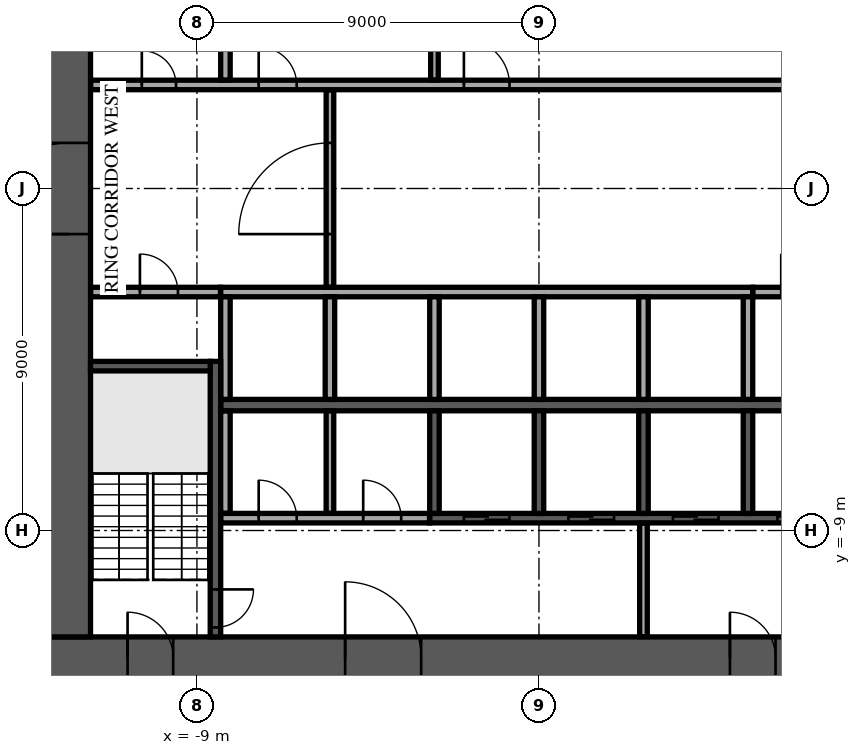
"""IFC4 building model, lengths in metres.
Left out: names, types, materials, properties, quantities, classifications, styles, units other than length and angle.
Written with IfcOpenShell. Run it as: python <this file> out.ifc"""

import sys

from ifc_helpers import new_model, si_unit, direction, frame, frame_2d, origin, place, context, subcontext, project, spatial, rectangle, extrude, element, fill, save


model = new_model("IFC4")
c1 = context("Model", 3, precision=1e-05, world=origin(), true_north=direction((0.0, 1.0)))
c2 = subcontext(c1, "Body", "Model", "MODEL_VIEW")
j1 = project(units=[si_unit("LENGTHUNIT", "METRE"), si_unit("PLANEANGLEUNIT", "RADIAN")], contexts=[c1])
p1 = place(None, origin())
s1 = spatial("IfcSite", under=j1, at=p1, CompositionType="ELEMENT")
p2 = place(p1, origin())
s2 = spatial("IfcBuilding", under=s1, at=p2, CompositionType="ELEMENT")
p3 = place(p2, frame((0.0, 0.0, 122.1)))
s3 = spatial("IfcBuildingStorey", under=s2, at=p3, CompositionType="ELEMENT", Elevation=122.1)
p4 = place(p3, frame((-12.9, -12.35, 0.0), z_axis=(0.0, 0.0, 1.0), x_axis=(1.0, 0.0, 0.0)))
e1 = element("IfcWall", 1, at=p4, inside=s3, PredefinedType="SHEAR", context=c2, shape_type="SweptSolid", body=[
    extrude(rectangle(XDim=25.8, YDim=1.1, at=frame_2d((12.9, 0.0))), origin(), (0.0, 0.0, 1.0), 3.58),
])
p5 = place(p4, frame((7.8, 0.0, 0.0)))
e2 = element("IfcOpeningElement", 2, at=p5, cuts=e1, PredefinedType="OPENING", context=c2, shape_type="SweptSolid", body=[
    extrude(rectangle(XDim=2.0, YDim=2.1, at=frame_2d((1.0, 1.05))), frame((0.0, 0.56, 0.0), z_axis=(0.0, -1.0, 0.0), x_axis=(1.0, 0.0, 0.0)), (0.0, 0.0, 1.0), 1.12),
])
p6 = place(p4, frame((17.925, 0.0, 0.0)))
e3 = element("IfcOpeningElement", 3, at=p6, cuts=e1, PredefinedType="OPENING", context=c2, shape_type="SweptSolid", body=[
    extrude(rectangle(XDim=1.2, YDim=2.1, at=frame_2d((0.6, 1.05))), frame((0.0, 0.56, 0.0), z_axis=(0.0, -1.0, 0.0), x_axis=(1.0, 0.0, 0.0)), (0.0, 0.0, 1.0), 1.12),
])
p7 = place(p4, frame((2.075, 0.0, 0.0)))
e4 = element("IfcOpeningElement", 4, at=p7, cuts=e1, PredefinedType="OPENING", context=c2, shape_type="SweptSolid", body=[
    extrude(rectangle(XDim=1.2, YDim=2.1, at=frame_2d((0.6, 1.05))), frame((0.0, 0.56, 0.0), z_axis=(0.0, -1.0, 0.0), x_axis=(1.0, 0.0, 0.0)), (0.0, 0.0, 1.0), 1.12),
])
p8 = place(p4, frame((22.525, 0.0, 0.0)))
e5 = element("IfcOpeningElement", 5, at=p8, cuts=e1, PredefinedType="OPENING", context=c2, shape_type="SweptSolid", body=[
    extrude(rectangle(XDim=1.2, YDim=2.1, at=frame_2d((0.6, 1.05))), frame((0.0, 0.56, 0.0), z_axis=(0.0, -1.0, 0.0), x_axis=(1.0, 0.0, 0.0)), (0.0, 0.0, 1.0), 1.12),
])
p9 = place(p3, frame((-12.35, -11.8, 0.0), z_axis=(0.0, 0.0, 1.0), x_axis=(0.0, 1.0, 0.0)))
e6 = element("IfcWall", 6, at=p9, inside=s3, PredefinedType="SHEAR", context=c2, shape_type="SweptSolid", body=[
    extrude(rectangle(XDim=23.6, YDim=1.1, at=frame_2d((11.8, 0.0))), origin(), (0.0, 0.0, 1.0), 3.58),
])
p10 = place(p9, frame((10.6, 0.0, 0.0)))
e7 = element("IfcOpeningElement", 7, at=p10, cuts=e6, PredefinedType="OPENING", context=c2, shape_type="SweptSolid", body=[
    extrude(rectangle(XDim=2.4, YDim=2.4, at=frame_2d((1.2, 1.2))), frame((0.0, 0.56, 0.0), z_axis=(0.0, -1.0, 0.0), x_axis=(1.0, 0.0, 0.0)), (0.0, 0.0, 1.0), 1.12),
])
p11 = place(p3, frame((-8.375, -5.7, 0.0), z_axis=(0.0, 0.0, 1.0), x_axis=(1.0, 0.0, 0.0)))
e8 = element("IfcWall", 8, at=p11, inside=s3, PredefinedType="SOLIDWALL", context=c2, shape_type="SweptSolid", body=[
    extrude(rectangle(XDim=16.75, YDim=0.3, at=frame_2d((8.375, 0.0))), origin(), (0.0, 0.0, 1.0), 3.58),
])
p12 = place(p3, frame((-8.375, -2.725, 0.0), z_axis=(0.0, 0.0, 1.0), x_axis=(1.0, 0.0, 0.0)))
e9 = element("IfcWall", 9, at=p12, inside=s3, PredefinedType="SOLIDWALL", context=c2, shape_type="SweptSolid", body=[
    extrude(rectangle(XDim=14.0, YDim=0.25, at=frame_2d((7.0, 0.0))), origin(), (0.0, 0.0, 1.0), 3.58),
])
for number, where, z_axis, x_axis in (
    (10, (-8.25, -5.55, 0.0), (0.0, 0.0, 1.0), (0.0, 1.0, 0.0)),
    (11, (-5.5, -5.55, 0.0), (0.0, 0.0, 1.0), (0.0, 1.0, 0.0)),
    (12, (-2.75, -5.55, 0.0), (0.0, 0.0, 1.0), (0.0, 1.0, 0.0)),
    (13, (0.0, -5.55, 0.0), (0.0, 0.0, 1.0), (0.0, 1.0, 0.0)),
    (14, (2.75, -5.55, 0.0), (0.0, 0.0, 1.0), (0.0, 1.0, 0.0)),
    (15, (5.5, -5.55, 0.0), (0.0, 0.0, 1.0), (0.0, 1.0, 0.0)),
):
    element("IfcWall", number, at=place(p3, frame(where, z_axis=z_axis, x_axis=x_axis)), inside=s3, PredefinedType="SOLIDWALL", context=c2, shape_type="SweptSolid", body=[
        extrude(rectangle(XDim=2.7, YDim=0.25, at=frame_2d((1.35, 0.0))), origin(), (0.0, 0.0, 1.0), 3.58),
    ])
p13 = place(p3, frame((-2.875, -8.675, 0.0), z_axis=(0.0, 0.0, 1.0), x_axis=(1.0, 0.0, 0.0)))
e16 = element("IfcWall", 16, at=p13, inside=s3, PredefinedType="SOLIDWALL", context=c2, shape_type="SweptSolid", body=[
    extrude(rectangle(XDim=11.25, YDim=0.25, at=frame_2d((5.625, 0.0))), origin(), (0.0, 0.0, 1.0), 3.58),
])
p14 = place(p13, frame((0.9, 0.0, 0.0)))
e17 = element("IfcOpeningElement", 17, at=p14, cuts=e16, PredefinedType="OPENING", context=c2, shape_type="SweptSolid", body=[
    extrude(rectangle(XDim=1.2, YDim=2.1, at=frame_2d((0.6, 1.05))), frame((0.0, 0.135, 0.0), z_axis=(0.0, -1.0, 0.0), x_axis=(1.0, 0.0, 0.0)), (0.0, 0.0, 1.0), 0.27),
])
p15 = place(p13, frame((3.65, 0.0, 0.0)))
e18 = element("IfcOpeningElement", 18, at=p15, cuts=e16, PredefinedType="OPENING", context=c2, shape_type="SweptSolid", body=[
    extrude(rectangle(XDim=1.2, YDim=2.1, at=frame_2d((0.6, 1.05))), frame((0.0, 0.135, 0.0), z_axis=(0.0, -1.0, 0.0), x_axis=(1.0, 0.0, 0.0)), (0.0, 0.0, 1.0), 0.27),
])
p16 = place(p13, frame((6.4, 0.0, 0.0)))
e19 = element("IfcOpeningElement", 19, at=p16, cuts=e16, PredefinedType="OPENING", context=c2, shape_type="SweptSolid", body=[
    extrude(rectangle(XDim=1.2, YDim=2.1, at=frame_2d((0.6, 1.05))), frame((0.0, 0.135, 0.0), z_axis=(0.0, -1.0, 0.0), x_axis=(1.0, 0.0, 0.0)), (0.0, 0.0, 1.0), 0.27),
])
p17 = place(p13, frame((9.15, 0.0, 0.0)))
e20 = element("IfcOpeningElement", 20, at=p17, cuts=e16, PredefinedType="OPENING", context=c2, shape_type="SweptSolid", body=[
    extrude(rectangle(XDim=1.2, YDim=2.1, at=frame_2d((0.6, 1.05))), frame((0.0, 0.135, 0.0), z_axis=(0.0, -1.0, 0.0), x_axis=(1.0, 0.0, 0.0)), (0.0, 0.0, 1.0), 0.27),
])
for number, where, z_axis, x_axis in (
    (21, (-2.75, -8.55, 0.0), (0.0, 0.0, 1.0), (0.0, 1.0, 0.0)),
    (22, (0.0, -8.55, 0.0), (0.0, 0.0, 1.0), (0.0, 1.0, 0.0)),
    (23, (2.75, -8.55, 0.0), (0.0, 0.0, 1.0), (0.0, 1.0, 0.0)),
    (24, (5.5, -8.55, 0.0), (0.0, 0.0, 1.0), (0.0, 1.0, 0.0)),
):
    element("IfcWall", number, at=place(p3, frame(where, z_axis=z_axis, x_axis=x_axis)), inside=s3, PredefinedType="SOLIDWALL", context=c2, shape_type="SweptSolid", body=[
        extrude(rectangle(XDim=2.7, YDim=0.25, at=frame_2d((1.35, 0.0))), origin(), (0.0, 0.0, 1.0), 3.58),
    ])
p18 = place(p3, frame((-8.512, -4.55, 0.0), z_axis=(0.0, 0.0, 1.0), x_axis=(0.0, -1.0, 0.0)))
e25 = element("IfcWall", 25, at=p18, inside=s3, PredefinedType="SOLIDWALL", context=c2, shape_type="SweptSolid", body=[
    extrude(rectangle(XDim=7.25, YDim=0.275, at=frame_2d((3.625, 0.0))), origin(), (0.0, 0.0, 1.0), 3.58),
])
p19 = place(p18, frame((6.0, 0.0, 0.0)))
e26 = element("IfcOpeningElement", 26, at=p19, cuts=e25, PredefinedType="OPENING", context=c2, shape_type="SweptSolid", body=[
    extrude(rectangle(XDim=1.0, YDim=2.1, at=frame_2d((0.5, 1.05))), frame((0.0, 0.147, 0.0), z_axis=(0.0, -1.0, 0.0), x_axis=(1.0, 0.0, 0.0)), (0.0, 0.0, 1.0), 0.295),
])
p20 = place(p3, frame((-8.65, -4.675, 0.0), z_axis=(0.0, 0.0, 1.0), x_axis=(-1.0, 0.0, 0.0)))
e27 = element("IfcWall", 27, at=p20, inside=s3, PredefinedType="SOLIDWALL", context=c2, shape_type="SweptSolid", body=[
    extrude(rectangle(XDim=3.15, YDim=0.25, at=frame_2d((1.575, 0.0))), origin(), (0.0, 0.0, 1.0), 3.58),
])
p21 = place(p3, frame((2.75, -11.795, 0.0), z_axis=(0.0, 0.0, 1.0), x_axis=(0.0, 1.0, 0.0)))
e28 = element("IfcWall", 28, at=p21, inside=s3, PredefinedType="PARTITIONING", context=c2, shape_type="SweptSolid", body=[
    extrude(rectangle(XDim=2.99, YDim=0.2, at=frame_2d((1.495, 0.0))), origin(), (0.0, 0.0, 1.0), 3.58),
])
p22 = place(p3, frame((-8.37, -8.675, 0.0), z_axis=(0.0, 0.0, 1.0), x_axis=(1.0, 0.0, 0.0)))
e29 = element("IfcWall", 29, at=p22, inside=s3, PredefinedType="PARTITIONING", context=c2, shape_type="SweptSolid", body=[
    extrude(rectangle(XDim=5.49, YDim=0.25, at=frame_2d((2.745, 0.0))), origin(), (0.0, 0.0, 1.0), 3.58),
])
p23 = place(p22, frame((0.995, 0.0, 0.0)))
e30 = element("IfcOpeningElement", 30, at=p23, cuts=e29, PredefinedType="OPENING", context=c2, shape_type="SweptSolid", body=[
    extrude(rectangle(XDim=1.0, YDim=2.1, at=frame_2d((0.5, 1.05))), frame((0.0, 0.135, 0.0), z_axis=(0.0, -1.0, 0.0), x_axis=(1.0, 0.0, 0.0)), (0.0, 0.0, 1.0), 0.27),
])
p24 = place(p22, frame((3.745, 0.0, 0.0)))
e31 = element("IfcOpeningElement", 31, at=p24, cuts=e29, PredefinedType="OPENING", context=c2, shape_type="SweptSolid", body=[
    extrude(rectangle(XDim=1.0, YDim=2.1, at=frame_2d((0.5, 1.05))), frame((0.0, 0.135, 0.0), z_axis=(0.0, -1.0, 0.0), x_axis=(1.0, 0.0, 0.0)), (0.0, 0.0, 1.0), 0.27),
])
p25 = place(p3, frame((-8.25, -8.545, 0.0), z_axis=(0.0, 0.0, 1.0), x_axis=(0.0, 1.0, 0.0)))
e32 = element("IfcWall", 32, at=p25, inside=s3, PredefinedType="PARTITIONING", context=c2, shape_type="SweptSolid", body=[
    extrude(rectangle(XDim=2.69, YDim=0.25, at=frame_2d((1.345, 0.0))), origin(), (0.0, 0.0, 1.0), 3.58),
])
p26 = place(p3, frame((-5.5, -8.545, 0.0), z_axis=(0.0, 0.0, 1.0), x_axis=(0.0, 1.0, 0.0)))
e33 = element("IfcWall", 33, at=p26, inside=s3, PredefinedType="PARTITIONING", context=c2, shape_type="SweptSolid", body=[
    extrude(rectangle(XDim=2.69, YDim=0.2, at=frame_2d((1.345, 0.0))), origin(), (0.0, 0.0, 1.0), 3.58),
])
p27 = place(p3, frame((-11.795, -2.725, 0.0), z_axis=(0.0, 0.0, 1.0), x_axis=(1.0, 0.0, 0.0)))
e34 = element("IfcWall", 34, at=p27, inside=s3, PredefinedType="PARTITIONING", context=c2, shape_type="SweptSolid", body=[
    extrude(rectangle(XDim=3.415, YDim=0.25, at=frame_2d((1.708, 0.0))), origin(), (0.0, 0.0, 1.0), 3.58),
])
p28 = place(p27, frame((1.295, 0.0, 0.0)))
e35 = element("IfcOpeningElement", 35, at=p28, cuts=e34, PredefinedType="OPENING", context=c2, shape_type="SweptSolid", body=[
    extrude(rectangle(XDim=1.0, YDim=2.1, at=frame_2d((0.5, 1.05))), frame((0.0, 0.135, 0.0), z_axis=(0.0, -1.0, 0.0), x_axis=(1.0, 0.0, 0.0)), (0.0, 0.0, 1.0), 0.27),
])
p29 = place(p3, frame((5.63, -2.725, 0.0), z_axis=(0.0, 0.0, 1.0), x_axis=(1.0, 0.0, 0.0)))
e36 = element("IfcWall", 36, at=p29, inside=s3, PredefinedType="PARTITIONING", context=c2, shape_type="SweptSolid", body=[
    extrude(rectangle(XDim=6.165, YDim=0.25, at=frame_2d((3.083, 0.0))), origin(), (0.0, 0.0, 1.0), 3.58),
])
p30 = place(p29, frame((0.745, 0.0, 0.0)))
e37 = element("IfcOpeningElement", 37, at=p30, cuts=e36, PredefinedType="OPENING", context=c2, shape_type="SweptSolid", body=[
    extrude(rectangle(XDim=1.0, YDim=2.1, at=frame_2d((0.5, 1.05))), frame((0.0, 0.135, 0.0), z_axis=(0.0, -1.0, 0.0), x_axis=(1.0, 0.0, 0.0)), (0.0, 0.0, 1.0), 0.27),
])
p31 = place(p29, frame((3.92, 0.0, 0.0)))
e38 = element("IfcOpeningElement", 38, at=p31, cuts=e36, PredefinedType="OPENING", context=c2, shape_type="SweptSolid", body=[
    extrude(rectangle(XDim=0.9, YDim=2.1, at=frame_2d((0.45, 1.05))), frame((0.0, 0.135, 0.0), z_axis=(0.0, -1.0, 0.0), x_axis=(1.0, 0.0, 0.0)), (0.0, 0.0, 1.0), 0.27),
])
p32 = place(p3, frame((-5.5, -2.595, 0.0), z_axis=(0.0, 0.0, 1.0), x_axis=(0.0, 1.0, 0.0)))
e39 = element("IfcWall", 39, at=p32, inside=s3, PredefinedType="PARTITIONING", context=c2, shape_type="SweptSolid", body=[
    extrude(rectangle(XDim=5.19, YDim=0.2, at=frame_2d((2.595, 0.0))), origin(), (0.0, 0.0, 1.0), 3.58),
])
p33 = place(p32, frame((1.395, 0.0, 0.0)))
e40 = element("IfcOpeningElement", 40, at=p33, cuts=e39, PredefinedType="OPENING", context=c2, shape_type="SweptSolid", body=[
    extrude(rectangle(XDim=2.4, YDim=2.4, at=frame_2d((1.2, 1.2))), frame((0.0, 0.11, 0.0), z_axis=(0.0, -1.0, 0.0), x_axis=(1.0, 0.0, 0.0)), (0.0, 0.0, 1.0), 0.22),
])
p34 = place(p3, frame((-11.795, 2.725, 0.0), z_axis=(0.0, 0.0, 1.0), x_axis=(1.0, 0.0, 0.0)))
e41 = element("IfcWall", 41, at=p34, inside=s3, PredefinedType="PARTITIONING", context=c2, shape_type="SweptSolid", body=[
    extrude(rectangle(XDim=23.59, YDim=0.25, at=frame_2d((11.795, 0.0))), origin(), (0.0, 0.0, 1.0), 3.58),
])
p35 = place(p34, frame((21.345, 0.0, 0.0)))
e42 = element("IfcOpeningElement", 42, at=p35, cuts=e41, PredefinedType="OPENING", context=c2, shape_type="SweptSolid", body=[
    extrude(rectangle(XDim=0.9, YDim=2.1, at=frame_2d((0.45, 1.05))), frame((0.0, 0.135, 0.0), z_axis=(0.0, -1.0, 0.0), x_axis=(1.0, 0.0, 0.0)), (0.0, 0.0, 1.0), 0.27),
])
p36 = place(p34, frame((1.345, 0.0, 0.0)))
e43 = element("IfcOpeningElement", 43, at=p36, cuts=e41, PredefinedType="OPENING", context=c2, shape_type="SweptSolid", body=[
    extrude(rectangle(XDim=0.9, YDim=2.1, at=frame_2d((0.45, 1.05))), frame((0.0, 0.135, 0.0), z_axis=(0.0, -1.0, 0.0), x_axis=(1.0, 0.0, 0.0)), (0.0, 0.0, 1.0), 0.27),
])
p37 = place(p34, frame((4.42, 0.0, 0.0)))
e44 = element("IfcOpeningElement", 44, at=p37, cuts=e41, PredefinedType="OPENING", context=c2, shape_type="SweptSolid", body=[
    extrude(rectangle(XDim=1.0, YDim=2.1, at=frame_2d((0.5, 1.05))), frame((0.0, 0.135, 0.0), z_axis=(0.0, -1.0, 0.0), x_axis=(1.0, 0.0, 0.0)), (0.0, 0.0, 1.0), 0.27),
])
p38 = place(p34, frame((9.82, 0.0, 0.0)))
e45 = element("IfcOpeningElement", 45, at=p38, cuts=e41, PredefinedType="OPENING", context=c2, shape_type="SweptSolid", body=[
    extrude(rectangle(XDim=1.2, YDim=2.1, at=frame_2d((0.6, 1.05))), frame((0.0, 0.135, 0.0), z_axis=(0.0, -1.0, 0.0), x_axis=(1.0, 0.0, 0.0)), (0.0, 0.0, 1.0), 0.27),
])
p39 = place(p3, frame((-8.25, 2.855, 0.0), z_axis=(0.0, 0.0, 1.0), x_axis=(0.0, 1.0, 0.0)))
e46 = element("IfcWall", 46, at=p39, inside=s3, PredefinedType="PARTITIONING", context=c2, shape_type="SweptSolid", body=[
    extrude(rectangle(XDim=1.715, YDim=0.25, at=frame_2d((0.857, 0.0))), origin(), (0.0, 0.0, 1.0), 3.58),
])
p40 = place(p3, frame((-2.75, 2.855, 0.0), z_axis=(0.0, 0.0, 1.0), x_axis=(0.0, 1.0, 0.0)))
e47 = element("IfcWall", 47, at=p40, inside=s3, PredefinedType="PARTITIONING", context=c2, shape_type="SweptSolid", body=[
    extrude(rectangle(XDim=2.69, YDim=0.2, at=frame_2d((1.345, 0.0))), origin(), (0.0, 0.0, 1.0), 3.58),
])
p41 = place(p5, origin())
e48 = element("IfcDoor", 48, at=p41, inside=s3, OperationType="SINGLE_SWING_LEFT", PredefinedType="DOOR", context=c2, shape_type="SweptSolid", body=[
    extrude(rectangle(XDim=2.0, YDim=2.1, at=frame_2d((1.0, 1.05))), frame((0.0, 0.025, 0.0), z_axis=(0.0, -1.0, 0.0), x_axis=(1.0, 0.0, 0.0)), (0.0, 0.0, 1.0), 0.05),
])
fill(e2, e48)
p42 = place(p6, origin())
e49 = element("IfcDoor", 49, at=p42, inside=s3, OperationType="SINGLE_SWING_LEFT", PredefinedType="DOOR", context=c2, shape_type="SweptSolid", body=[
    extrude(rectangle(XDim=1.2, YDim=2.1, at=frame_2d((0.6, 1.05))), frame((0.0, 0.025, 0.0), z_axis=(0.0, -1.0, 0.0), x_axis=(1.0, 0.0, 0.0)), (0.0, 0.0, 1.0), 0.05),
])
fill(e3, e49)
p43 = place(p7, origin())
e50 = element("IfcDoor", 50, at=p43, inside=s3, OperationType="SINGLE_SWING_LEFT", PredefinedType="DOOR", context=c2, shape_type="SweptSolid", body=[
    extrude(rectangle(XDim=1.2, YDim=2.1, at=frame_2d((0.6, 1.05))), frame((0.0, 0.025, 0.0), z_axis=(0.0, -1.0, 0.0), x_axis=(1.0, 0.0, 0.0)), (0.0, 0.0, 1.0), 0.05),
])
fill(e4, e50)
p44 = place(p10, origin())
e51 = element("IfcDoor", 51, at=p44, inside=s3, OperationType="SINGLE_SWING_LEFT", PredefinedType="DOOR", context=c2, shape_type="SweptSolid", body=[
    extrude(rectangle(XDim=2.4, YDim=2.4, at=frame_2d((1.2, 1.2))), frame((0.0, 0.025, 0.0), z_axis=(0.0, -1.0, 0.0), x_axis=(1.0, 0.0, 0.0)), (0.0, 0.0, 1.0), 0.05),
])
fill(e7, e51)
p45 = place(p14, origin())
e52 = element("IfcDoor", 52, at=p45, inside=s3, OperationType="DOUBLE_DOOR_SLIDING", PredefinedType="DOOR", context=c2, shape_type="SweptSolid", body=[
    extrude(rectangle(XDim=1.2, YDim=2.1, at=frame_2d((0.6, 1.05))), frame((0.0, 0.025, 0.0), z_axis=(0.0, -1.0, 0.0), x_axis=(1.0, 0.0, 0.0)), (0.0, 0.0, 1.0), 0.05),
])
fill(e17, e52)
p46 = place(p15, origin())
e53 = element("IfcDoor", 53, at=p46, inside=s3, OperationType="DOUBLE_DOOR_SLIDING", PredefinedType="DOOR", context=c2, shape_type="SweptSolid", body=[
    extrude(rectangle(XDim=1.2, YDim=2.1, at=frame_2d((0.6, 1.05))), frame((0.0, 0.025, 0.0), z_axis=(0.0, -1.0, 0.0), x_axis=(1.0, 0.0, 0.0)), (0.0, 0.0, 1.0), 0.05),
])
fill(e18, e53)
p47 = place(p16, origin())
e54 = element("IfcDoor", 54, at=p47, inside=s3, OperationType="DOUBLE_DOOR_SLIDING", PredefinedType="DOOR", context=c2, shape_type="SweptSolid", body=[
    extrude(rectangle(XDim=1.2, YDim=2.1, at=frame_2d((0.6, 1.05))), frame((0.0, 0.025, 0.0), z_axis=(0.0, -1.0, 0.0), x_axis=(1.0, 0.0, 0.0)), (0.0, 0.0, 1.0), 0.05),
])
fill(e19, e54)
p48 = place(p17, origin())
e55 = element("IfcDoor", 55, at=p48, inside=s3, OperationType="DOUBLE_DOOR_SLIDING", PredefinedType="DOOR", context=c2, shape_type="SweptSolid", body=[
    extrude(rectangle(XDim=1.2, YDim=2.1, at=frame_2d((0.6, 1.05))), frame((0.0, 0.025, 0.0), z_axis=(0.0, -1.0, 0.0), x_axis=(1.0, 0.0, 0.0)), (0.0, 0.0, 1.0), 0.05),
])
fill(e20, e55)
p49 = place(p19, origin())
e56 = element("IfcDoor", 56, at=p49, inside=s3, OperationType="SINGLE_SWING_LEFT", PredefinedType="DOOR", context=c2, shape_type="SweptSolid", body=[
    extrude(rectangle(XDim=1.0, YDim=2.1, at=frame_2d((0.5, 1.05))), frame((0.0, 0.025, 0.0), z_axis=(0.0, -1.0, 0.0), x_axis=(1.0, 0.0, 0.0)), (0.0, 0.0, 1.0), 0.05),
])
fill(e26, e56)
p50 = place(p23, origin())
e57 = element("IfcDoor", 57, at=p50, inside=s3, OperationType="SINGLE_SWING_LEFT", PredefinedType="DOOR", context=c2, shape_type="SweptSolid", body=[
    extrude(rectangle(XDim=1.0, YDim=2.1, at=frame_2d((0.5, 1.05))), frame((0.0, 0.025, 0.0), z_axis=(0.0, -1.0, 0.0), x_axis=(1.0, 0.0, 0.0)), (0.0, 0.0, 1.0), 0.05),
])
fill(e30, e57)
p51 = place(p24, origin())
e58 = element("IfcDoor", 58, at=p51, inside=s3, OperationType="SINGLE_SWING_LEFT", PredefinedType="DOOR", context=c2, shape_type="SweptSolid", body=[
    extrude(rectangle(XDim=1.0, YDim=2.1, at=frame_2d((0.5, 1.05))), frame((0.0, 0.025, 0.0), z_axis=(0.0, -1.0, 0.0), x_axis=(1.0, 0.0, 0.0)), (0.0, 0.0, 1.0), 0.05),
])
fill(e31, e58)
p52 = place(p28, origin())
e59 = element("IfcDoor", 59, at=p52, inside=s3, OperationType="SINGLE_SWING_LEFT", PredefinedType="DOOR", context=c2, shape_type="SweptSolid", body=[
    extrude(rectangle(XDim=1.0, YDim=2.1, at=frame_2d((0.5, 1.05))), frame((0.0, 0.025, 0.0), z_axis=(0.0, -1.0, 0.0), x_axis=(1.0, 0.0, 0.0)), (0.0, 0.0, 1.0), 0.05),
])
fill(e35, e59)
p53 = place(p36, origin())
e60 = element("IfcDoor", 60, at=p53, inside=s3, OperationType="SINGLE_SWING_LEFT", PredefinedType="DOOR", context=c2, shape_type="SweptSolid", body=[
    extrude(rectangle(XDim=0.9, YDim=2.1, at=frame_2d((0.45, 1.05))), frame((0.0, 0.025, 0.0), z_axis=(0.0, -1.0, 0.0), x_axis=(1.0, 0.0, 0.0)), (0.0, 0.0, 1.0), 0.05),
])
fill(e43, e60)
p54 = place(p37, origin())
e61 = element("IfcDoor", 61, at=p54, inside=s3, OperationType="SINGLE_SWING_LEFT", PredefinedType="DOOR", context=c2, shape_type="SweptSolid", body=[
    extrude(rectangle(XDim=1.0, YDim=2.1, at=frame_2d((0.5, 1.05))), frame((0.0, 0.025, 0.0), z_axis=(0.0, -1.0, 0.0), x_axis=(1.0, 0.0, 0.0)), (0.0, 0.0, 1.0), 0.05),
])
fill(e44, e61)
p55 = place(p38, origin())
e62 = element("IfcDoor", 62, at=p55, inside=s3, OperationType="SINGLE_SWING_LEFT", PredefinedType="DOOR", context=c2, shape_type="SweptSolid", body=[
    extrude(rectangle(XDim=1.2, YDim=2.1, at=frame_2d((0.6, 1.05))), frame((0.0, 0.025, 0.0), z_axis=(0.0, -1.0, 0.0), x_axis=(1.0, 0.0, 0.0)), (0.0, 0.0, 1.0), 0.05),
])
fill(e45, e62)
p56 = place(p33, origin())
e63 = element("IfcDoor", 63, at=p56, inside=s3, OperationType="SINGLE_SWING_LEFT", PredefinedType="DOOR", context=c2, shape_type="SweptSolid", body=[
    extrude(rectangle(XDim=2.4, YDim=2.4, at=frame_2d((1.2, 1.2))), frame((0.0, 0.025, 0.0), z_axis=(0.0, -1.0, 0.0), x_axis=(1.0, 0.0, 0.0)), (0.0, 0.0, 1.0), 0.05),
])
fill(e40, e63)
save(model, sys.argv[1])
